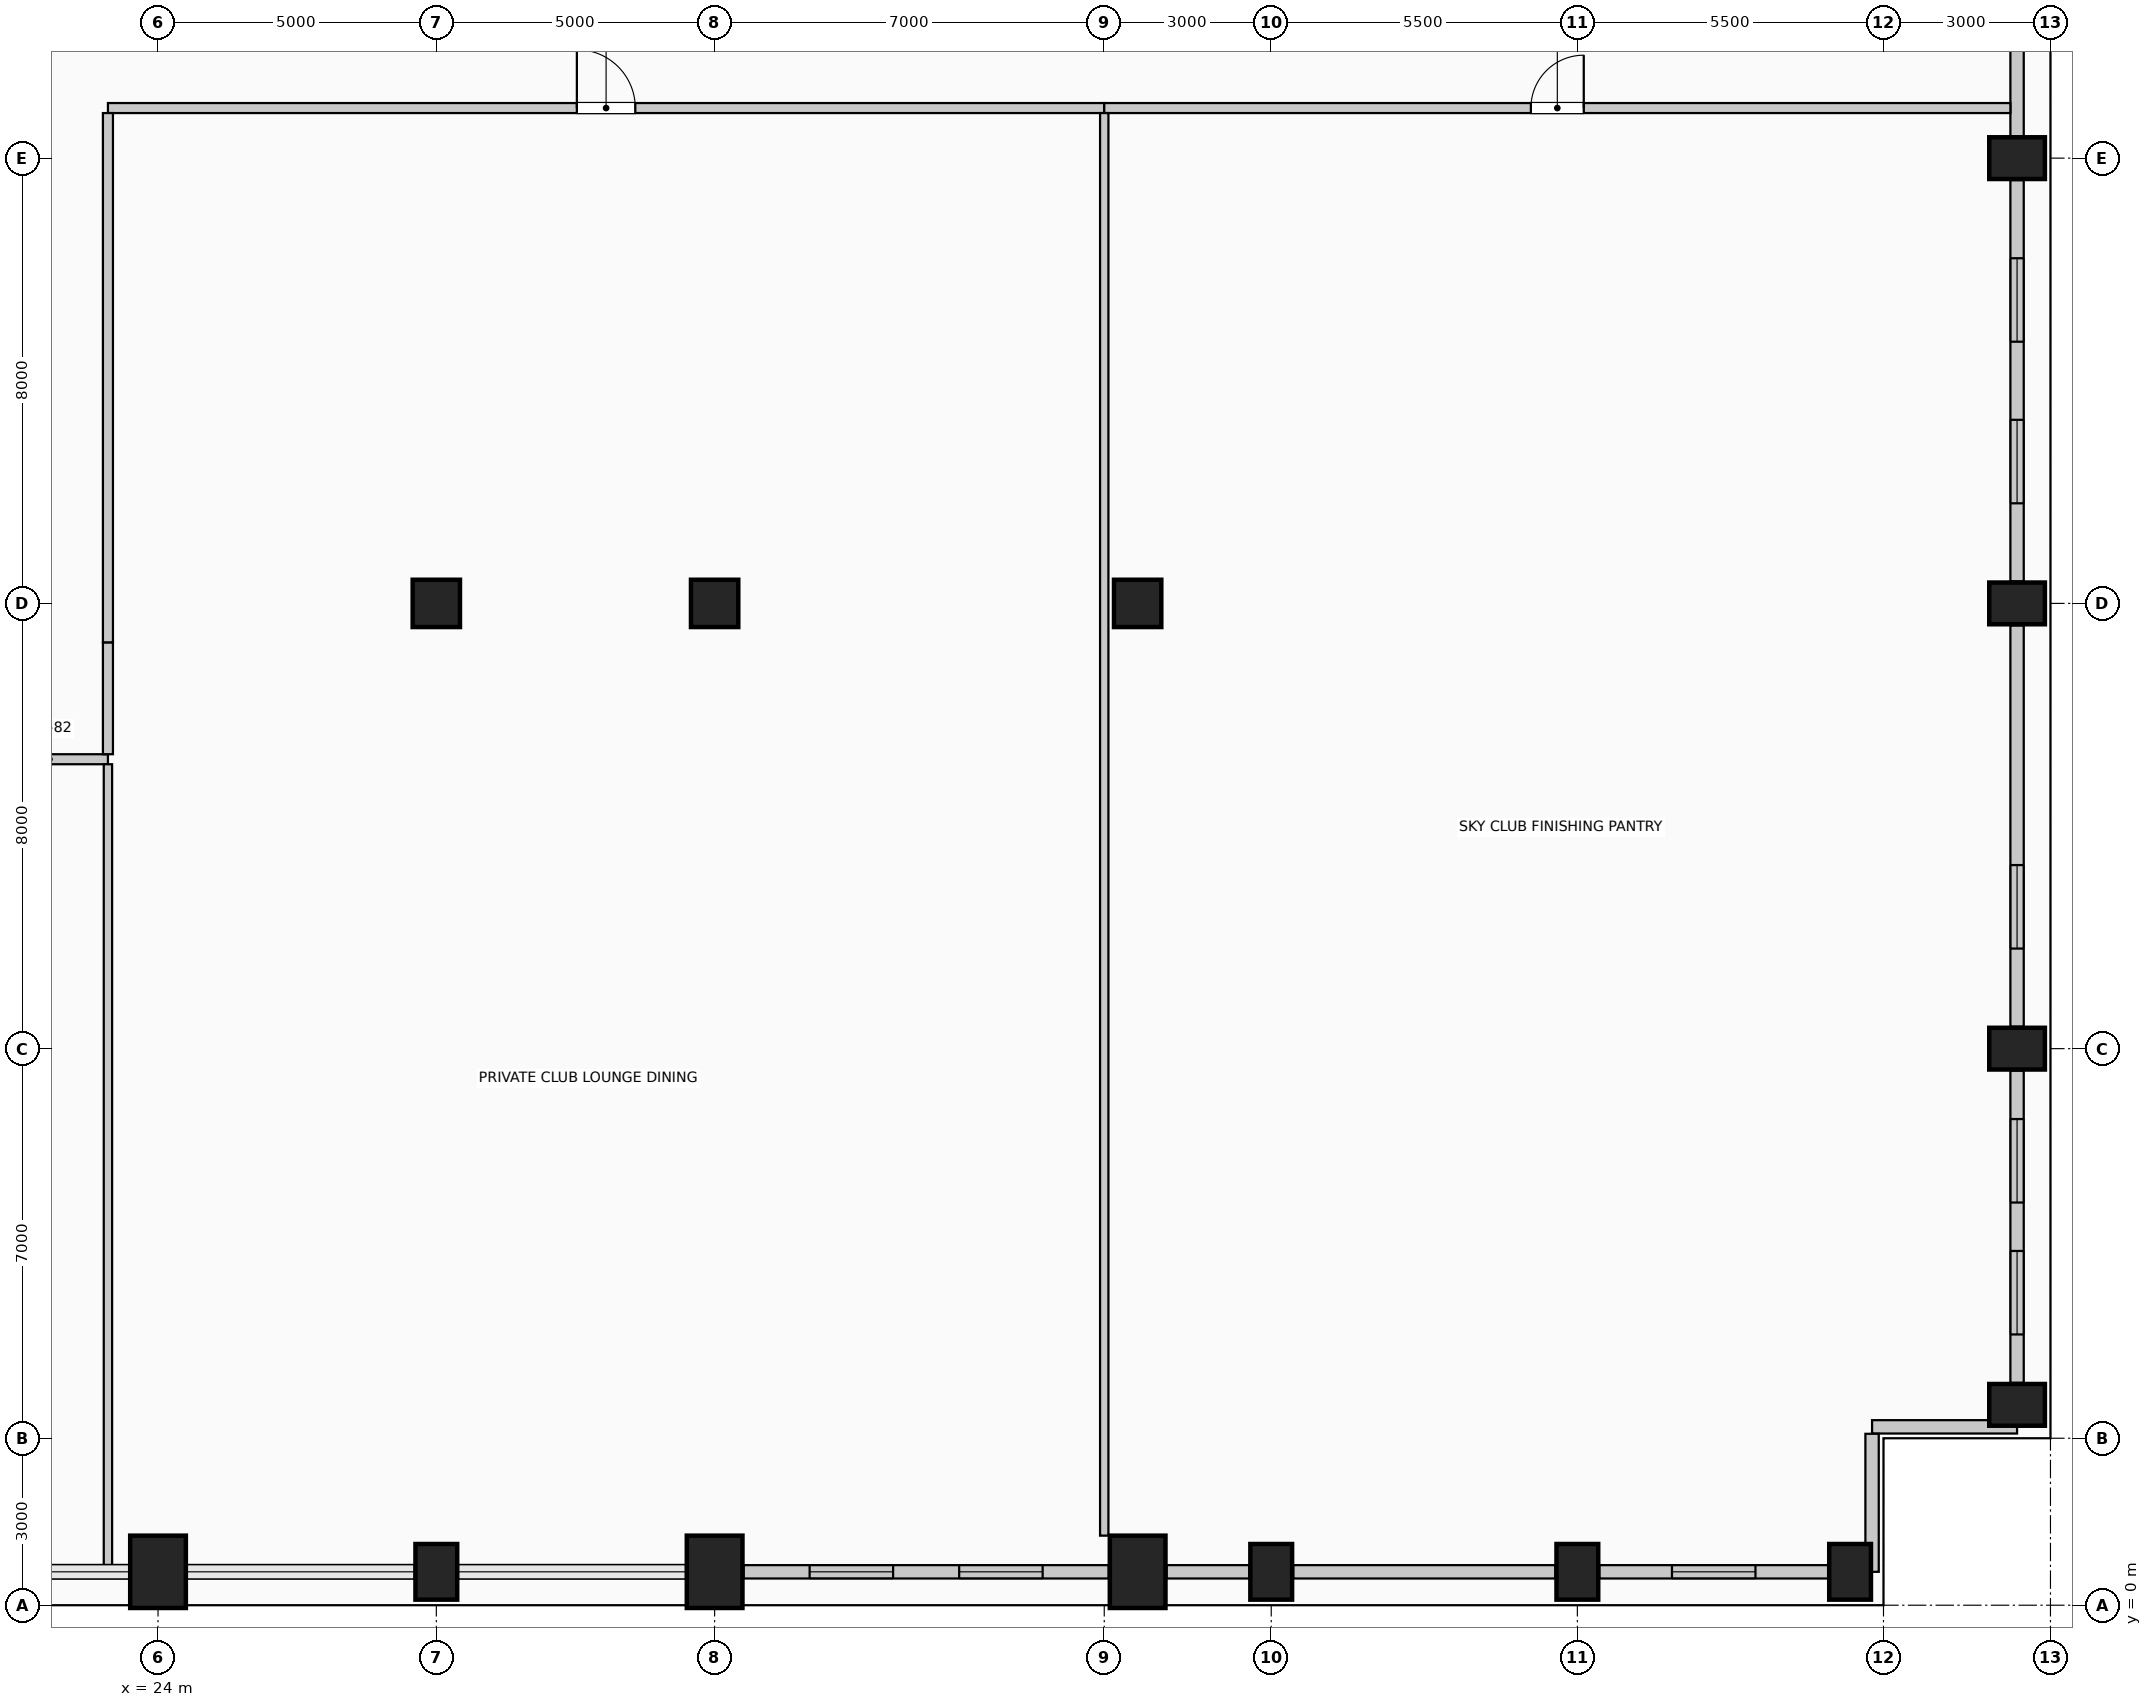
"""IFC4 building model, lengths in metres.
Left out: names, types, materials, properties, quantities, classifications, styles, units other than length and angle.
Written with IfcOpenShell. Run it as: python <this file> out.ifc"""

import sys

from ifc_helpers import new_model, si_unit, direction, frame, frame_2d, origin, origin_2d, place, context, subcontext, project, spatial, rectangle, circle, extrude, element, fill, save


model = new_model("IFC4")
c1 = context("Model", 3, precision=1e-05, world=origin(), true_north=direction((0.0, 1.0)))
c2 = subcontext(c1, "Body", "Model", "MODEL_VIEW")
j1 = project(units=[si_unit("LENGTHUNIT", "METRE"), si_unit("PLANEANGLEUNIT", "RADIAN")], contexts=[c1])
p1 = place(None, origin())
s1 = spatial("IfcSite", under=j1, at=p1, CompositionType="ELEMENT")
p2 = place(p1, origin())
s2 = spatial("IfcBuilding", under=s1, at=p2, CompositionType="ELEMENT")
p3 = place(p2, frame((0.0, 0.0, 243.8)))
s3 = spatial("IfcBuildingStorey", under=s2, at=p3, CompositionType="ELEMENT", Elevation=243.8)
p4 = place(p3, frame((24.0, 0.6, 0.0), z_axis=(0.0, 0.0, 1.0), x_axis=(1.0, 0.0, 0.0)))
e1 = element("IfcColumn", 1, at=p4, inside=s3, PredefinedType="COLUMN", context=c2, shape_type="SweptSolid", body=[
    extrude(rectangle(XDim=1.0, YDim=1.3, at=origin_2d()), origin(), (0.0, 0.0, 1.0), 4.8),
])
p5 = place(p3, frame((29.0, 0.6, 0.0), z_axis=(0.0, 0.0, 1.0), x_axis=(1.0, 0.0, 0.0)))
e2 = element("IfcColumn", 2, at=p5, inside=s3, PredefinedType="COLUMN", context=c2, shape_type="SweptSolid", body=[
    extrude(rectangle(XDim=0.75, YDim=1.0, at=origin_2d()), origin(), (0.0, 0.0, 1.0), 4.8),
])
for number, where, z_axis, x_axis in (
    (3, (34.0, 0.6, 0.0), (0.0, 0.0, 1.0), (1.0, 0.0, 0.0)),
    (4, (41.6, 0.6, 0.0), (0.0, 0.0, 1.0), (1.0, 0.0, 0.0)),
):
    element("IfcColumn", number, at=place(p3, frame(where, z_axis=z_axis, x_axis=x_axis)), inside=s3, PredefinedType="COLUMN", context=c2, shape_type="SweptSolid", body=[
        extrude(rectangle(XDim=1.0, YDim=1.3, at=origin_2d()), origin(), (0.0, 0.0, 1.0), 4.8),
    ])
for number, where, z_axis, x_axis in (
    (5, (44.0, 0.6, 0.0), (0.0, 0.0, 1.0), (1.0, 0.0, 0.0)),
    (6, (49.5, 0.6, 0.0), (0.0, 0.0, 1.0), (1.0, 0.0, 0.0)),
    (7, (54.4, 0.6, 0.0), (0.0, 0.0, 1.0), (1.0, 0.0, 0.0)),
    (8, (57.4, 3.6, 0.0), (0.0, 0.0, 1.0), (0.0, 1.0, 0.0)),
    (9, (57.4, 10.0, 0.0), (0.0, 0.0, 1.0), (0.0, 1.0, 0.0)),
    (10, (57.4, 18.0, 0.0), (0.0, 0.0, 1.0), (0.0, 1.0, 0.0)),
    (11, (57.4, 26.0, 0.0), (0.0, 0.0, 1.0), (0.0, 1.0, 0.0)),
):
    element("IfcColumn", number, at=place(p3, frame(where, z_axis=z_axis, x_axis=x_axis)), inside=s3, PredefinedType="COLUMN", context=c2, shape_type="SweptSolid", body=[
        extrude(rectangle(XDim=0.75, YDim=1.0, at=origin_2d()), origin(), (0.0, 0.0, 1.0), 4.8),
    ])
for number, where, z_axis, x_axis in (
    (12, (29.0, 18.0, 0.0), (0.0, 0.0, 1.0), (1.0, 0.0, 0.0)),
    (13, (41.6, 18.0, 0.0), (0.0, 0.0, 1.0), (1.0, 0.0, 0.0)),
    (14, (34.0, 18.0, 0.0), (0.0, 0.0, 1.0), (1.0, 0.0, 0.0)),
):
    element("IfcColumn", number, at=place(p3, frame(where, z_axis=z_axis, x_axis=x_axis)), inside=s3, PredefinedType="COLUMN", context=c2, shape_type="SweptSolid", body=[
        extrude(circle(Radius=0.425, at=origin_2d()), origin(), (0.0, 0.0, 1.0), 4.8),
    ])
p6 = place(p3, frame((41.08, 0.6, 0.0), z_axis=(0.0, 0.0, 1.0), x_axis=(-1.0, 0.0, 0.0)))
e15 = element("IfcWall", 15, at=p6, inside=s3, PredefinedType="SOLIDWALL", context=c2, shape_type="SweptSolid", body=[
    extrude(rectangle(XDim=6.56, YDim=0.24, at=frame_2d((3.28, 0.0))), origin(), (0.0, 0.0, 1.0), 3.8),
])
p7 = place(p6, frame((1.187, 0.0, 0.42)))
e16 = element("IfcOpeningElement", 16, at=p7, cuts=e15, PredefinedType="OPENING", context=c2, shape_type="SweptSolid", body=[
    extrude(rectangle(XDim=1.5, YDim=2.2, at=frame_2d((0.75, 1.1))), frame((0.0, 0.13, 0.0), z_axis=(0.0, -1.0, 0.0), x_axis=(1.0, 0.0, 0.0)), (0.0, 0.0, 1.0), 0.26),
])
p8 = place(p6, frame((3.873, 0.0, 0.42)))
e17 = element("IfcOpeningElement", 17, at=p8, cuts=e15, PredefinedType="OPENING", context=c2, shape_type="SweptSolid", body=[
    extrude(rectangle(XDim=1.5, YDim=2.2, at=frame_2d((0.75, 1.1))), frame((0.0, 0.13, 0.0), z_axis=(0.0, -1.0, 0.0), x_axis=(1.0, 0.0, 0.0)), (0.0, 0.0, 1.0), 0.26),
])
p9 = place(p3, frame((43.605, 0.6, 0.0), z_axis=(0.0, 0.0, 1.0), x_axis=(-1.0, 0.0, 0.0)))
e18 = element("IfcWall", 18, at=p9, inside=s3, PredefinedType="SOLIDWALL", context=c2, shape_type="SweptSolid", body=[
    extrude(rectangle(XDim=1.485, YDim=0.24, at=frame_2d((0.742, 0.0))), origin(), (0.0, 0.0, 1.0), 3.8),
])
p10 = place(p3, frame((49.105, 0.6, 0.0), z_axis=(0.0, 0.0, 1.0), x_axis=(-1.0, 0.0, 0.0)))
e19 = element("IfcWall", 19, at=p10, inside=s3, PredefinedType="SOLIDWALL", context=c2, shape_type="SweptSolid", body=[
    extrude(rectangle(XDim=4.71, YDim=0.24, at=frame_2d((2.355, 0.0))), origin(), (0.0, 0.0, 1.0), 3.8),
])
p11 = place(p3, frame((54.005, 0.6, 0.0), z_axis=(0.0, 0.0, 1.0), x_axis=(-1.0, 0.0, 0.0)))
e20 = element("IfcWall", 20, at=p11, inside=s3, PredefinedType="SOLIDWALL", context=c2, shape_type="SweptSolid", body=[
    extrude(rectangle(XDim=4.11, YDim=0.24, at=frame_2d((2.055, 0.0))), origin(), (0.0, 0.0, 1.0), 3.8),
])
p12 = place(p11, frame((1.305, 0.0, 0.42)))
e21 = element("IfcOpeningElement", 21, at=p12, cuts=e20, PredefinedType="OPENING", context=c2, shape_type="SweptSolid", body=[
    extrude(rectangle(XDim=1.5, YDim=2.2, at=frame_2d((0.75, 1.1))), frame((0.0, 0.13, 0.0), z_axis=(0.0, -1.0, 0.0), x_axis=(1.0, 0.0, 0.0)), (0.0, 0.0, 1.0), 0.26),
])
p13 = place(p3, frame((57.4, 9.605, 0.0), z_axis=(0.0, 0.0, 1.0), x_axis=(0.0, -1.0, 0.0)))
e22 = element("IfcWall", 22, at=p13, inside=s3, PredefinedType="SOLIDWALL", context=c2, shape_type="SweptSolid", body=[
    extrude(rectangle(XDim=5.61, YDim=0.24, at=frame_2d((2.805, 0.0))), origin(), (0.0, 0.0, 1.0), 3.8),
])
p14 = place(p13, frame((0.87, 0.0, 0.42)))
e23 = element("IfcOpeningElement", 23, at=p14, cuts=e22, PredefinedType="OPENING", context=c2, shape_type="SweptSolid", body=[
    extrude(rectangle(XDim=1.5, YDim=2.2, at=frame_2d((0.75, 1.1))), frame((0.0, 0.13, 0.0), z_axis=(0.0, -1.0, 0.0), x_axis=(1.0, 0.0, 0.0)), (0.0, 0.0, 1.0), 0.26),
])
p15 = place(p13, frame((3.24, 0.0, 0.42)))
e24 = element("IfcOpeningElement", 24, at=p15, cuts=e22, PredefinedType="OPENING", context=c2, shape_type="SweptSolid", body=[
    extrude(rectangle(XDim=1.5, YDim=2.2, at=frame_2d((0.75, 1.1))), frame((0.0, 0.13, 0.0), z_axis=(0.0, -1.0, 0.0), x_axis=(1.0, 0.0, 0.0)), (0.0, 0.0, 1.0), 0.26),
])
p16 = place(p3, frame((57.4, 17.605, 0.0), z_axis=(0.0, 0.0, 1.0), x_axis=(0.0, -1.0, 0.0)))
e25 = element("IfcWall", 25, at=p16, inside=s3, PredefinedType="SOLIDWALL", context=c2, shape_type="SweptSolid", body=[
    extrude(rectangle(XDim=7.21, YDim=0.24, at=frame_2d((3.605, 0.0))), origin(), (0.0, 0.0, 1.0), 3.8),
])
p17 = place(p16, frame((4.307, 0.0, 0.42)))
e26 = element("IfcOpeningElement", 26, at=p17, cuts=e25, PredefinedType="OPENING", context=c2, shape_type="SweptSolid", body=[
    extrude(rectangle(XDim=1.5, YDim=2.2, at=frame_2d((0.75, 1.1))), frame((0.0, 0.13, 0.0), z_axis=(0.0, -1.0, 0.0), x_axis=(1.0, 0.0, 0.0)), (0.0, 0.0, 1.0), 0.26),
])
p18 = place(p3, frame((57.4, 25.605, 0.0), z_axis=(0.0, 0.0, 1.0), x_axis=(0.0, -1.0, 0.0)))
e27 = element("IfcWall", 27, at=p18, inside=s3, PredefinedType="SOLIDWALL", context=c2, shape_type="SweptSolid", body=[
    extrude(rectangle(XDim=7.21, YDim=0.24, at=frame_2d((3.605, 0.0))), origin(), (0.0, 0.0, 1.0), 3.8),
])
p19 = place(p18, frame((1.403, 0.0, 0.42)))
e28 = element("IfcOpeningElement", 28, at=p19, cuts=e27, PredefinedType="OPENING", context=c2, shape_type="SweptSolid", body=[
    extrude(rectangle(XDim=1.5, YDim=2.2, at=frame_2d((0.75, 1.1))), frame((0.0, 0.13, 0.0), z_axis=(0.0, -1.0, 0.0), x_axis=(1.0, 0.0, 0.0)), (0.0, 0.0, 1.0), 0.26),
])
p20 = place(p18, frame((4.307, 0.0, 0.42)))
e29 = element("IfcOpeningElement", 29, at=p20, cuts=e27, PredefinedType="OPENING", context=c2, shape_type="SweptSolid", body=[
    extrude(rectangle(XDim=1.5, YDim=2.2, at=frame_2d((0.75, 1.1))), frame((0.0, 0.13, 0.0), z_axis=(0.0, -1.0, 0.0), x_axis=(1.0, 0.0, 0.0)), (0.0, 0.0, 1.0), 0.26),
])
p21 = place(p3, frame((57.4, 33.605, 0.0), z_axis=(0.0, 0.0, 1.0), x_axis=(0.0, -1.0, 0.0)))
e30 = element("IfcWall", 30, at=p21, inside=s3, PredefinedType="SOLIDWALL", context=c2, shape_type="SweptSolid", body=[
    extrude(rectangle(XDim=7.21, YDim=0.24, at=frame_2d((3.605, 0.0))), origin(), (0.0, 0.0, 1.0), 3.8),
])
p22 = place(p3, frame((57.4, 3.205, 0.0), z_axis=(0.0, 0.0, 1.0), x_axis=(-1.0, 0.0, 0.0)))
e31 = element("IfcWall", 31, at=p22, inside=s3, PredefinedType="SOLIDWALL", context=c2, shape_type="SweptSolid", body=[
    extrude(rectangle(XDim=2.605, YDim=0.24, at=frame_2d((1.302, 0.0))), origin(), (0.0, 0.0, 1.0), 4.55),
])
p23 = place(p3, frame((54.795, 3.08, 0.0), z_axis=(0.0, 0.0, 1.0), x_axis=(0.0, -1.0, 0.0)))
e32 = element("IfcWall", 32, at=p23, inside=s3, PredefinedType="SOLIDWALL", context=c2, shape_type="SweptSolid", body=[
    extrude(rectangle(XDim=2.48, YDim=0.24, at=frame_2d((1.24, 0.0))), origin(), (0.0, 0.0, 1.0), 4.55),
])
p24 = place(p3, frame((21.0, 15.2, 0.0), z_axis=(0.0, 0.0, 1.0), x_axis=(1.0, 0.0, 0.0)))
e33 = element("IfcWall", 33, at=p24, inside=s3, PredefinedType="PARTITIONING", context=c2, shape_type="SweptSolid", body=[
    extrude(rectangle(XDim=2.1, YDim=0.18, at=frame_2d((1.05, 0.0))), origin(), (0.0, 0.0, 1.0), 4.55),
])
p25 = place(p3, frame((23.1, 26.9, 0.0), z_axis=(0.0, 0.0, 1.0), x_axis=(1.0, 0.0, 0.0)))
e34 = element("IfcWall", 34, at=p25, inside=s3, PredefinedType="PARTITIONING", context=c2, shape_type="SweptSolid", body=[
    extrude(rectangle(XDim=17.9, YDim=0.18, at=frame_2d((8.95, 0.0))), origin(), (0.0, 0.0, 1.0), 4.55),
])
p26 = place(p25, frame((8.425, 0.0, 0.0)))
e35 = element("IfcOpeningElement", 35, at=p26, cuts=e34, PredefinedType="OPENING", context=c2, shape_type="SweptSolid", body=[
    extrude(rectangle(XDim=1.05, YDim=2.15, at=frame_2d((0.525, 1.075))), frame((0.0, 0.1, 0.0), z_axis=(0.0, -1.0, 0.0), x_axis=(1.0, 0.0, 0.0)), (0.0, 0.0, 1.0), 0.2),
])
p27 = place(p3, frame((41.0, 26.9, 0.0), z_axis=(0.0, 0.0, 1.0), x_axis=(1.0, 0.0, 0.0)))
e36 = element("IfcWall", 36, at=p27, inside=s3, PredefinedType="PARTITIONING", context=c2, shape_type="SweptSolid", body=[
    extrude(rectangle(XDim=16.28, YDim=0.18, at=frame_2d((8.14, 0.0))), origin(), (0.0, 0.0, 1.0), 4.55),
])
p28 = place(p27, frame((7.665, 0.0, 0.0)))
e37 = element("IfcOpeningElement", 37, at=p28, cuts=e36, PredefinedType="OPENING", context=c2, shape_type="SweptSolid", body=[
    extrude(rectangle(XDim=0.95, YDim=2.15, at=frame_2d((0.475, 1.075))), frame((0.0, 0.1, 0.0), z_axis=(0.0, -1.0, 0.0), x_axis=(1.0, 0.0, 0.0)), (0.0, 0.0, 1.0), 0.2),
])
p29 = place(p3, frame((23.1, 0.6, 0.0), z_axis=(0.0, 0.0, 1.0), x_axis=(0.0, 1.0, 0.0)))
e38 = element("IfcWall", 38, at=p29, inside=s3, PredefinedType="PARTITIONING", context=c2, shape_type="SweptSolid", body=[
    extrude(rectangle(XDim=14.51, YDim=0.15, at=frame_2d((7.255, 0.0))), origin(), (0.0, 0.0, 1.0), 4.55),
])
p30 = place(p3, frame((23.1, 15.29, 0.0), z_axis=(0.0, 0.0, 1.0), x_axis=(0.0, 1.0, 0.0)))
e39 = element("IfcWall", 39, at=p30, inside=s3, PredefinedType="PARTITIONING", context=c2, shape_type="SweptSolid", body=[
    extrude(rectangle(XDim=2.01, YDim=0.18, at=frame_2d((1.005, 0.0))), origin(), (0.0, 0.0, 1.0), 4.55),
])
p31 = place(p3, frame((23.1, 17.3, 0.0), z_axis=(0.0, 0.0, 1.0), x_axis=(0.0, 1.0, 0.0)))
e40 = element("IfcWall", 40, at=p31, inside=s3, PredefinedType="PARTITIONING", context=c2, shape_type="SweptSolid", body=[
    extrude(rectangle(XDim=9.51, YDim=0.18, at=frame_2d((4.755, 0.0))), origin(), (0.0, 0.0, 1.0), 4.55),
])
p32 = place(p3, frame((41.0, 1.25, 0.0), z_axis=(0.0, 0.0, 1.0), x_axis=(0.0, 1.0, 0.0)))
e41 = element("IfcWall", 41, at=p32, inside=s3, PredefinedType="PARTITIONING", context=c2, shape_type="SweptSolid", body=[
    extrude(rectangle(XDim=25.56, YDim=0.15, at=frame_2d((12.78, 0.0))), origin(), (0.0, 0.0, 1.0), 4.55),
])
p33 = place(p7, origin())
e42 = element("IfcWindow", 42, at=p33, inside=s3, PartitioningType="SINGLE_PANEL", PredefinedType="WINDOW", context=c2, shape_type="SweptSolid", body=[
    extrude(rectangle(XDim=1.5, YDim=2.2, at=frame_2d((0.75, 1.1))), frame((0.0, 0.03, 0.0), z_axis=(0.0, -1.0, 0.0), x_axis=(1.0, 0.0, 0.0)), (0.0, 0.0, 1.0), 0.06),
])
fill(e16, e42)
p34 = place(p8, origin())
e43 = element("IfcWindow", 43, at=p34, inside=s3, PartitioningType="SINGLE_PANEL", PredefinedType="WINDOW", context=c2, shape_type="SweptSolid", body=[
    extrude(rectangle(XDim=1.5, YDim=2.2, at=frame_2d((0.75, 1.1))), frame((0.0, 0.03, 0.0), z_axis=(0.0, -1.0, 0.0), x_axis=(1.0, 0.0, 0.0)), (0.0, 0.0, 1.0), 0.06),
])
fill(e17, e43)
p35 = place(p12, origin())
e44 = element("IfcWindow", 44, at=p35, inside=s3, PartitioningType="SINGLE_PANEL", PredefinedType="WINDOW", context=c2, shape_type="SweptSolid", body=[
    extrude(rectangle(XDim=1.5, YDim=2.2, at=frame_2d((0.75, 1.1))), frame((0.0, 0.03, 0.0), z_axis=(0.0, -1.0, 0.0), x_axis=(1.0, 0.0, 0.0)), (0.0, 0.0, 1.0), 0.06),
])
fill(e21, e44)
p36 = place(p14, origin())
e45 = element("IfcWindow", 45, at=p36, inside=s3, PartitioningType="SINGLE_PANEL", PredefinedType="WINDOW", context=c2, shape_type="SweptSolid", body=[
    extrude(rectangle(XDim=1.5, YDim=2.2, at=frame_2d((0.75, 1.1))), frame((0.0, 0.03, 0.0), z_axis=(0.0, -1.0, 0.0), x_axis=(1.0, 0.0, 0.0)), (0.0, 0.0, 1.0), 0.06),
])
fill(e23, e45)
p37 = place(p15, origin())
e46 = element("IfcWindow", 46, at=p37, inside=s3, PartitioningType="SINGLE_PANEL", PredefinedType="WINDOW", context=c2, shape_type="SweptSolid", body=[
    extrude(rectangle(XDim=1.5, YDim=2.2, at=frame_2d((0.75, 1.1))), frame((0.0, 0.03, 0.0), z_axis=(0.0, -1.0, 0.0), x_axis=(1.0, 0.0, 0.0)), (0.0, 0.0, 1.0), 0.06),
])
fill(e24, e46)
p38 = place(p17, origin())
e47 = element("IfcWindow", 47, at=p38, inside=s3, PartitioningType="SINGLE_PANEL", PredefinedType="WINDOW", context=c2, shape_type="SweptSolid", body=[
    extrude(rectangle(XDim=1.5, YDim=2.2, at=frame_2d((0.75, 1.1))), frame((0.0, 0.03, 0.0), z_axis=(0.0, -1.0, 0.0), x_axis=(1.0, 0.0, 0.0)), (0.0, 0.0, 1.0), 0.06),
])
fill(e26, e47)
p39 = place(p19, origin())
e48 = element("IfcWindow", 48, at=p39, inside=s3, PartitioningType="SINGLE_PANEL", PredefinedType="WINDOW", context=c2, shape_type="SweptSolid", body=[
    extrude(rectangle(XDim=1.5, YDim=2.2, at=frame_2d((0.75, 1.1))), frame((0.0, 0.03, 0.0), z_axis=(0.0, -1.0, 0.0), x_axis=(1.0, 0.0, 0.0)), (0.0, 0.0, 1.0), 0.06),
])
fill(e28, e48)
p40 = place(p20, origin())
e49 = element("IfcWindow", 49, at=p40, inside=s3, PartitioningType="SINGLE_PANEL", PredefinedType="WINDOW", context=c2, shape_type="SweptSolid", body=[
    extrude(rectangle(XDim=1.5, YDim=2.2, at=frame_2d((0.75, 1.1))), frame((0.0, 0.03, 0.0), z_axis=(0.0, -1.0, 0.0), x_axis=(1.0, 0.0, 0.0)), (0.0, 0.0, 1.0), 0.06),
])
fill(e29, e49)
p41 = place(p26, origin())
e50 = element("IfcDoor", 50, at=p41, inside=s3, OperationType="SINGLE_SWING_LEFT", PredefinedType="DOOR", context=c2, shape_type="SweptSolid", body=[
    extrude(rectangle(XDim=1.05, YDim=2.15, at=frame_2d((0.525, 1.075))), frame((0.0, 0.025, 0.0), z_axis=(0.0, -1.0, 0.0), x_axis=(1.0, 0.0, 0.0)), (0.0, 0.0, 1.0), 0.05),
])
fill(e35, e50)
p42 = place(p28, origin())
e51 = element("IfcDoor", 51, at=p42, inside=s3, OperationType="SINGLE_SWING_RIGHT", PredefinedType="DOOR", context=c2, shape_type="SweptSolid", body=[
    extrude(rectangle(XDim=0.95, YDim=2.15, at=frame_2d((0.475, 1.075))), frame((0.0, 0.025, 0.0), z_axis=(0.0, -1.0, 0.0), x_axis=(1.0, 0.0, 0.0)), (0.0, 0.0, 1.0), 0.05),
])
fill(e37, e51)
save(model, sys.argv[1])
